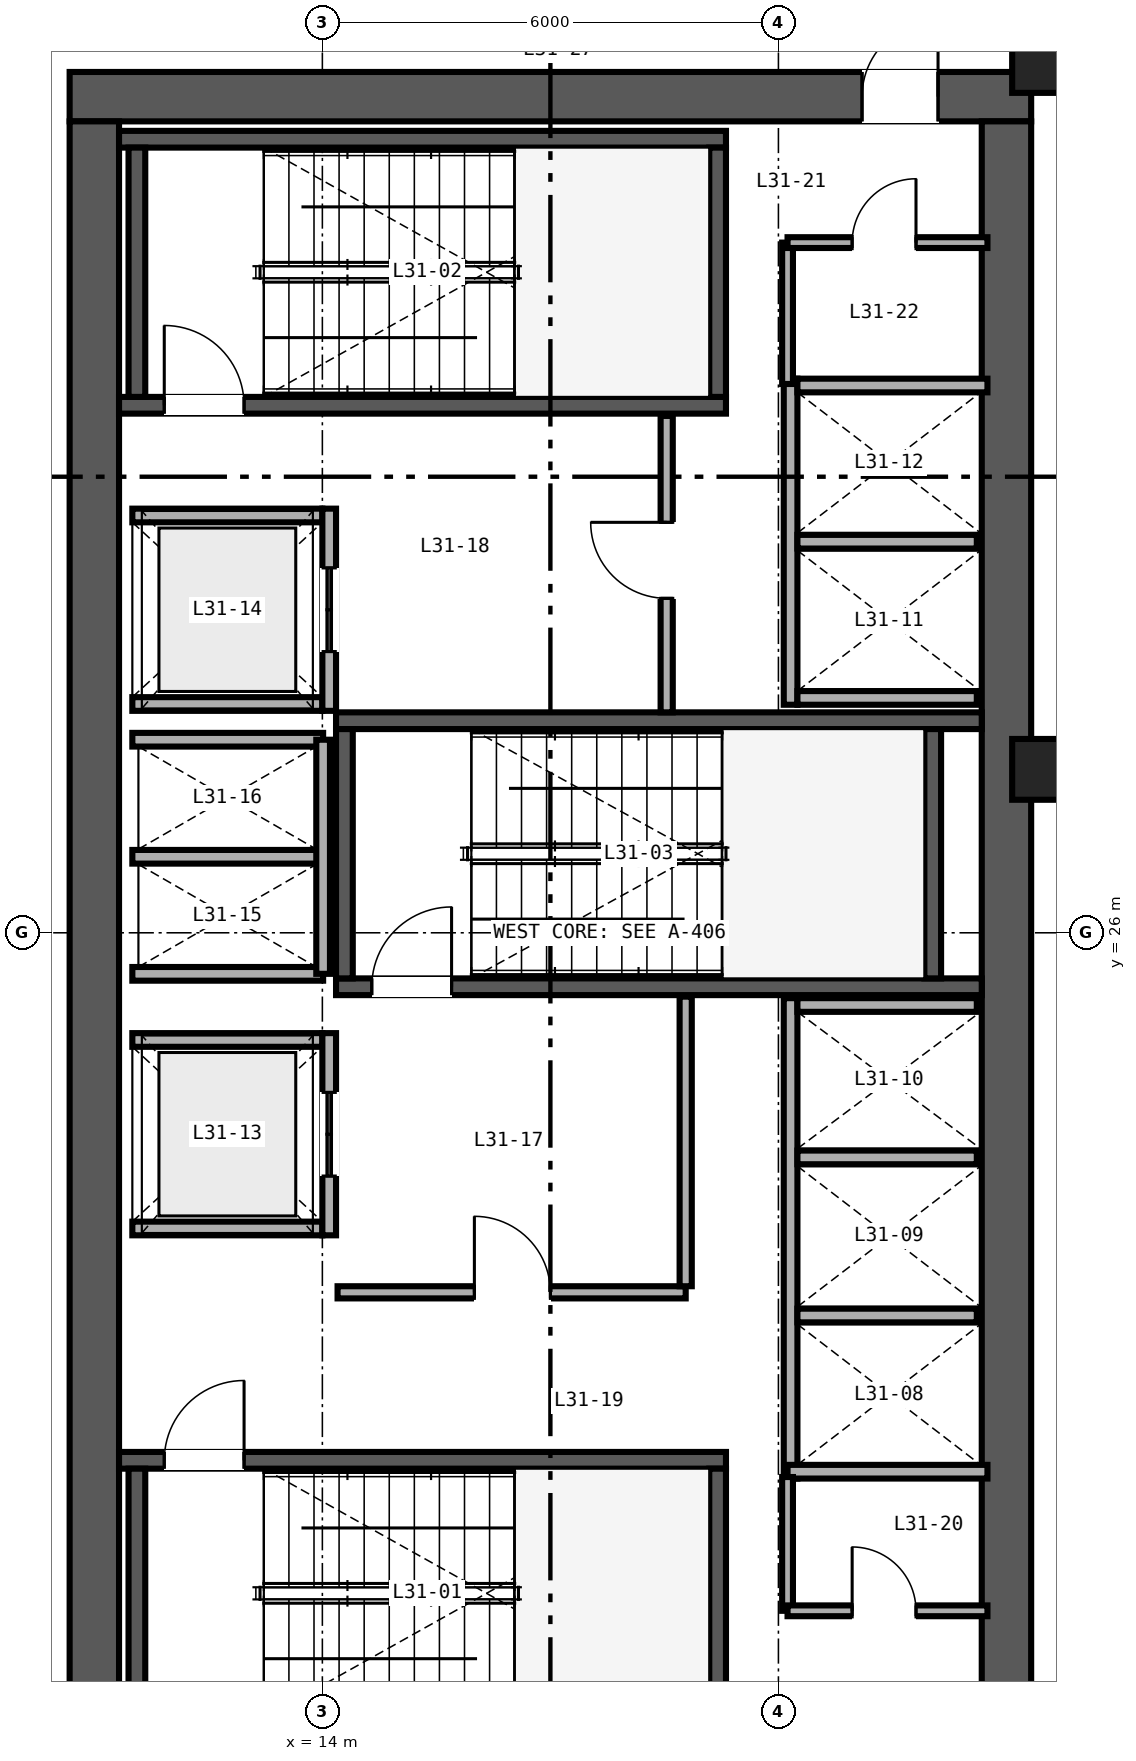
"""IFC4 building model, lengths in metres.
Left out: names, types, materials, properties, quantities, classifications, styles, units other than length and angle.
Written with IfcOpenShell. Run it as: python <this file> out.ifc"""

import sys

from ifc_helpers import new_model, si_unit, direction, frame, frame_2d, origin, origin_2d, place, context, subcontext, project, spatial, rectangle, hollow_rectangle, extrude, source, transform, mapped, element, fill, save


model = new_model("IFC4")
c1 = context("Model", 3, precision=1e-05, world=origin(), true_north=direction((0.0, 1.0)))
c2 = subcontext(c1, "Body", "Model", "MODEL_VIEW")
j1 = project(units=[si_unit("LENGTHUNIT", "METRE"), si_unit("PLANEANGLEUNIT", "RADIAN")], contexts=[c1])
p1 = place(None, origin())
s1 = spatial("IfcSite", under=j1, at=p1, CompositionType="ELEMENT")
p2 = place(p1, origin())
s2 = spatial("IfcBuilding", under=s1, at=p2, CompositionType="ELEMENT")
p3 = place(p2, frame((0.0, 0.0, 126.0)))
s3 = spatial("IfcBuildingStorey", under=s2, at=p3, CompositionType="ELEMENT", Elevation=126.0)
p4 = place(p3, frame((10.675, 37.0, 0.0), z_axis=(0.0, 0.0, 1.0), x_axis=(1.0, 0.0, 0.0)))
e1 = element("IfcWall", 1, at=p4, inside=s3, PredefinedType="SHEAR", context=c2, shape_type="SweptSolid", body=[
    extrude(rectangle(XDim=12.65, YDim=0.65, at=frame_2d((6.325, 0.0))), origin(), (0.0, 0.0, 1.0), 3.36),
])
p5 = place(p4, frame((10.425, 0.0, 0.0)))
e2 = element("IfcOpeningElement", 2, at=p5, cuts=e1, PredefinedType="OPENING", context=c2, shape_type="SweptSolid", body=[
    extrude(rectangle(XDim=1.0, YDim=2.15, at=frame_2d((0.5, 1.075))), frame((0.0, 0.335, 0.0), z_axis=(0.0, -1.0, 0.0), x_axis=(1.0, 0.0, 0.0)), (0.0, 0.0, 1.0), 0.67),
])
for number, where, z_axis, x_axis in (
    (3, (11.0, 15.325, 0.0), (0.0, 0.0, 1.0), (0.0, 1.0, 0.0)),
    (4, (23.0, 15.325, 0.0), (0.0, 0.0, 1.0), (0.0, 1.0, 0.0)),
):
    element("IfcWall", number, at=place(p3, frame(where, z_axis=z_axis, x_axis=x_axis)), inside=s3, PredefinedType="SHEAR", context=c2, shape_type="SweptSolid", body=[
        extrude(rectangle(XDim=21.35, YDim=0.65, at=frame_2d((10.675, 0.0))), origin(), (0.0, 0.0, 1.0), 3.36),
    ])
p6 = place(p3, frame((11.325, 19.06, 0.0), z_axis=(0.0, 0.0, 1.0), x_axis=(1.0, 0.0, 0.0)))
e5 = element("IfcWall", 5, at=p6, inside=s3, PredefinedType="SHEAR", context=c2, shape_type="SweptSolid", body=[
    extrude(rectangle(XDim=7.985, YDim=0.22, at=frame_2d((3.993, 0.0))), origin(), (0.0, 0.0, 1.0), 3.4),
])
p7 = place(p6, frame((0.595, 0.0, 0.0)))
e6 = element("IfcOpeningElement", 6, at=p7, cuts=e5, PredefinedType="OPENING", context=c2, shape_type="SweptSolid", body=[
    extrude(rectangle(XDim=1.05, YDim=2.15, at=frame_2d((0.525, 1.075))), frame((0.0, 0.12, 0.0), z_axis=(0.0, -1.0, 0.0), x_axis=(1.0, 0.0, 0.0)), (0.0, 0.0, 1.0), 0.24),
])
for number, where, z_axis, x_axis in (
    (7, (11.56, 15.67, 0.0), (0.0, 0.0, 1.0), (0.0, 1.0, 0.0)),
    (8, (19.2, 15.67, 0.0), (0.0, 0.0, 1.0), (0.0, 1.0, 0.0)),
):
    element("IfcWall", number, at=place(p3, frame(where, z_axis=z_axis, x_axis=x_axis)), inside=s3, PredefinedType="SHEAR", context=c2, shape_type="SweptSolid", body=[
        extrude(rectangle(XDim=3.28, YDim=0.22, at=frame_2d((1.64, 0.0))), origin(), (0.0, 0.0, 1.0), 3.4),
    ])
p8 = place(p3, frame((11.325, 32.94, 0.0), z_axis=(0.0, 0.0, 1.0), x_axis=(1.0, 0.0, 0.0)))
e9 = element("IfcWall", 9, at=p8, inside=s3, PredefinedType="SHEAR", context=c2, shape_type="SweptSolid", body=[
    extrude(rectangle(XDim=7.985, YDim=0.22, at=frame_2d((3.993, 0.0))), origin(), (0.0, 0.0, 1.0), 3.4),
])
p9 = place(p8, frame((0.595, 0.0, 0.0)))
e10 = element("IfcOpeningElement", 10, at=p9, cuts=e9, PredefinedType="OPENING", context=c2, shape_type="SweptSolid", body=[
    extrude(rectangle(XDim=1.05, YDim=2.15, at=frame_2d((0.525, 1.075))), frame((0.0, 0.12, 0.0), z_axis=(0.0, -1.0, 0.0), x_axis=(1.0, 0.0, 0.0)), (0.0, 0.0, 1.0), 0.24),
])
p10 = place(p3, frame((11.325, 36.44, 0.0), z_axis=(0.0, 0.0, 1.0), x_axis=(1.0, 0.0, 0.0)))
e11 = element("IfcWall", 11, at=p10, inside=s3, PredefinedType="SHEAR", context=c2, shape_type="SweptSolid", body=[
    extrude(rectangle(XDim=7.985, YDim=0.22, at=frame_2d((3.993, 0.0))), origin(), (0.0, 0.0, 1.0), 3.4),
])
for number, where, z_axis, x_axis in (
    (12, (11.56, 33.05, 0.0), (0.0, 0.0, 1.0), (0.0, 1.0, 0.0)),
    (13, (19.2, 33.05, 0.0), (0.0, 0.0, 1.0), (0.0, 1.0, 0.0)),
):
    element("IfcWall", number, at=place(p3, frame(where, z_axis=z_axis, x_axis=x_axis)), inside=s3, PredefinedType="SHEAR", context=c2, shape_type="SweptSolid", body=[
        extrude(rectangle(XDim=3.28, YDim=0.22, at=frame_2d((1.64, 0.0))), origin(), (0.0, 0.0, 1.0), 3.4),
    ])
p11 = place(p3, frame((14.18, 25.29, 0.0), z_axis=(0.0, 0.0, 1.0), x_axis=(1.0, 0.0, 0.0)))
e14 = element("IfcWall", 14, at=p11, inside=s3, PredefinedType="SHEAR", context=c2, shape_type="SweptSolid", body=[
    extrude(rectangle(XDim=8.495, YDim=0.22, at=frame_2d((4.248, 0.0))), origin(), (0.0, 0.0, 1.0), 3.4),
])
p12 = place(p11, frame((0.47, 0.0, 0.0)))
e15 = element("IfcOpeningElement", 15, at=p12, cuts=e14, PredefinedType="OPENING", context=c2, shape_type="SweptSolid", body=[
    extrude(rectangle(XDim=1.05, YDim=2.15, at=frame_2d((0.525, 1.075))), frame((0.0, 0.12, 0.0), z_axis=(0.0, -1.0, 0.0), x_axis=(1.0, 0.0, 0.0)), (0.0, 0.0, 1.0), 0.24),
])
p13 = place(p3, frame((14.18, 28.79, 0.0), z_axis=(0.0, 0.0, 1.0), x_axis=(1.0, 0.0, 0.0)))
e16 = element("IfcWall", 16, at=p13, inside=s3, PredefinedType="SHEAR", context=c2, shape_type="SweptSolid", body=[
    extrude(rectangle(XDim=8.495, YDim=0.22, at=frame_2d((4.248, 0.0))), origin(), (0.0, 0.0, 1.0), 3.4),
])
for number, where, z_axis, x_axis in (
    (17, (14.29, 25.4, 0.0), (0.0, 0.0, 1.0), (0.0, 1.0, 0.0)),
    (18, (22.03, 25.4, 0.0), (0.0, 0.0, 1.0), (0.0, 1.0, 0.0)),
):
    element("IfcWall", number, at=place(p3, frame(where, z_axis=z_axis, x_axis=x_axis)), inside=s3, PredefinedType="SHEAR", context=c2, shape_type="SweptSolid", body=[
        extrude(rectangle(XDim=3.28, YDim=0.22, at=frame_2d((1.64, 0.0))), origin(), (0.0, 0.0, 1.0), 3.4),
    ])
m1 = source(origin(), c2, "Body", "SweptSolid", [
    extrude(hollow_rectangle(XDim=0.85, YDim=0.8, WallThickness=0.032, at=origin_2d()), origin(), (0.0, 0.0, 1.0), 3.36),
])
for number, where, z_axis, x_axis in (
    (19, (23.5, 28.15, 0.0), (0.0, 0.0, 1.0), (1.0, 0.0, 0.0)),
    (20, (23.5, 37.45, 0.0), (0.0, 0.0, 1.0), (1.0, 0.0, 0.0)),
):
    element("IfcColumn", number, at=place(p3, frame(where, z_axis=z_axis, x_axis=x_axis)), inside=s3, PredefinedType="COLUMN", context=c2, shape_type="MappedRepresentation", body=[
        mapped(m1, transform((0.0, 0.0, 0.0), scale=1.0)),
    ])
p14 = place(p3, frame((20.16, 18.82, 0.0), z_axis=(0.0, 0.0, 1.0), x_axis=(0.0, 1.0, 0.0)))
e21 = element("IfcWall", 21, at=p14, inside=s3, PredefinedType="SOLIDWALL", context=c2, shape_type="SweptSolid", body=[
    extrude(rectangle(XDim=6.32, YDim=0.18, at=frame_2d((3.16, 0.0))), origin(), (0.0, 0.0, 1.0), 2.36),
])
p15 = place(p3, frame((20.12, 18.91, 0.0), z_axis=(0.0, 0.0, 1.0), x_axis=(1.0, 0.0, 0.0)))
e22 = element("IfcWall", 22, at=p15, inside=s3, PredefinedType="SOLIDWALL", context=c2, shape_type="SweptSolid", body=[
    extrude(rectangle(XDim=2.63, YDim=0.18, at=frame_2d((1.315, 0.0))), origin(), (0.0, 0.0, 1.0), 3.36),
])
p16 = place(p3, frame((20.25, 25.05, 0.0), z_axis=(0.0, 0.0, 1.0), x_axis=(1.0, 0.0, 0.0)))
e23 = element("IfcWall", 23, at=p16, inside=s3, PredefinedType="SOLIDWALL", context=c2, shape_type="SweptSolid", body=[
    extrude(rectangle(XDim=2.36, YDim=0.18, at=frame_2d((1.18, 0.0))), origin(), (0.0, 0.0, 1.0), 3.36),
])
p17 = place(p3, frame((20.25, 20.965, 0.0), z_axis=(0.0, 0.0, 1.0), x_axis=(1.0, 0.0, 0.0)))
e24 = element("IfcWall", 24, at=p17, inside=s3, PredefinedType="SOLIDWALL", context=c2, shape_type="SweptSolid", body=[
    extrude(rectangle(XDim=2.36, YDim=0.18, at=frame_2d((1.18, 0.0))), origin(), (0.0, 0.0, 1.0), 2.36),
])
p18 = place(p3, frame((20.25, 23.045, 0.0), z_axis=(0.0, 0.0, 1.0), x_axis=(1.0, 0.0, 0.0)))
e25 = element("IfcWall", 25, at=p18, inside=s3, PredefinedType="SOLIDWALL", context=c2, shape_type="SweptSolid", body=[
    extrude(rectangle(XDim=2.36, YDim=0.18, at=frame_2d((1.18, 0.0))), origin(), (0.0, 0.0, 1.0), 3.36),
])
p19 = place(p3, frame((20.16, 29.0, 0.0), z_axis=(0.0, 0.0, 1.0), x_axis=(0.0, 1.0, 0.0)))
e26 = element("IfcWall", 26, at=p19, inside=s3, PredefinedType="SOLIDWALL", context=c2, shape_type="SweptSolid", body=[
    extrude(rectangle(XDim=4.29, YDim=0.18, at=frame_2d((2.145, 0.0))), origin(), (0.0, 0.0, 1.0), 3.36),
])
p20 = place(p3, frame((20.25, 29.09, 0.0), z_axis=(0.0, 0.0, 1.0), x_axis=(1.0, 0.0, 0.0)))
e27 = element("IfcWall", 27, at=p20, inside=s3, PredefinedType="SOLIDWALL", context=c2, shape_type="SweptSolid", body=[
    extrude(rectangle(XDim=2.36, YDim=0.18, at=frame_2d((1.18, 0.0))), origin(), (0.0, 0.0, 1.0), 3.36),
])
p21 = place(p3, frame((20.25, 33.2, 0.0), z_axis=(0.0, 0.0, 1.0), x_axis=(1.0, 0.0, 0.0)))
e28 = element("IfcWall", 28, at=p21, inside=s3, PredefinedType="SOLIDWALL", context=c2, shape_type="SweptSolid", body=[
    extrude(rectangle(XDim=2.5, YDim=0.18, at=frame_2d((1.25, 0.0))), origin(), (0.0, 0.0, 1.0), 3.36),
])
p22 = place(p3, frame((20.25, 31.145, 0.0), z_axis=(0.0, 0.0, 1.0), x_axis=(1.0, 0.0, 0.0)))
e29 = element("IfcWall", 29, at=p22, inside=s3, PredefinedType="SOLIDWALL", context=c2, shape_type="SweptSolid", body=[
    extrude(rectangle(XDim=2.36, YDim=0.18, at=frame_2d((1.18, 0.0))), origin(), (0.0, 0.0, 1.0), 3.36),
])
for number, where, z_axis, x_axis in (
    (30, (11.5, 22.11, 0.0), (0.0, 0.0, 1.0), (1.0, 0.0, 0.0)),
    (31, (11.5, 24.59, 0.0), (0.0, 0.0, 1.0), (1.0, 0.0, 0.0)),
):
    element("IfcWall", number, at=place(p3, frame(where, z_axis=z_axis, x_axis=x_axis)), inside=s3, PredefinedType="SOLIDWALL", context=c2, shape_type="SweptSolid", body=[
        extrude(rectangle(XDim=2.5, YDim=0.18, at=frame_2d((1.25, 0.0))), origin(), (0.0, 0.0, 1.0), 3.36),
    ])
p23 = place(p3, frame((14.09, 22.02, 0.0), z_axis=(0.0, 0.0, 1.0), x_axis=(0.0, 1.0, 0.0)))
e32 = element("IfcWall", 32, at=p23, inside=s3, PredefinedType="SOLIDWALL", context=c2, shape_type="SweptSolid", body=[
    extrude(rectangle(XDim=2.66, YDim=0.18, at=frame_2d((1.33, 0.0))), origin(), (0.0, 0.0, 1.0), 3.36),
])
p24 = place(p23, frame((0.78, 0.0, 0.0)))
e33 = element("IfcOpeningElement", 33, at=p24, cuts=e32, PredefinedType="OPENING", context=c2, shape_type="SweptSolid", body=[
    extrude(rectangle(XDim=1.1, YDim=2.2, at=frame_2d((0.55, 1.1))), frame((0.0, 0.1, 0.0), z_axis=(0.0, -1.0, 0.0), x_axis=(1.0, 0.0, 0.0)), (0.0, 0.0, 1.0), 0.2),
])
for number, where, z_axis, x_axis in (
    (34, (11.5, 29.01, 0.0), (0.0, 0.0, 1.0), (1.0, 0.0, 0.0)),
    (35, (11.5, 31.49, 0.0), (0.0, 0.0, 1.0), (1.0, 0.0, 0.0)),
):
    element("IfcWall", number, at=place(p3, frame(where, z_axis=z_axis, x_axis=x_axis)), inside=s3, PredefinedType="SOLIDWALL", context=c2, shape_type="SweptSolid", body=[
        extrude(rectangle(XDim=2.5, YDim=0.18, at=frame_2d((1.25, 0.0))), origin(), (0.0, 0.0, 1.0), 3.36),
    ])
p25 = place(p3, frame((14.09, 28.92, 0.0), z_axis=(0.0, 0.0, 1.0), x_axis=(0.0, 1.0, 0.0)))
e36 = element("IfcWall", 36, at=p25, inside=s3, PredefinedType="SOLIDWALL", context=c2, shape_type="SweptSolid", body=[
    extrude(rectangle(XDim=2.66, YDim=0.18, at=frame_2d((1.33, 0.0))), origin(), (0.0, 0.0, 1.0), 3.36),
])
p26 = place(p25, frame((0.78, 0.0, 0.0)))
e37 = element("IfcOpeningElement", 37, at=p26, cuts=e36, PredefinedType="OPENING", context=c2, shape_type="SweptSolid", body=[
    extrude(rectangle(XDim=1.1, YDim=2.2, at=frame_2d((0.55, 1.1))), frame((0.0, 0.1, 0.0), z_axis=(0.0, -1.0, 0.0), x_axis=(1.0, 0.0, 0.0)), (0.0, 0.0, 1.0), 0.2),
])
for number, where, z_axis, x_axis in (
    (38, (11.5, 25.46, 0.0), (0.0, 0.0, 1.0), (1.0, 0.0, 0.0)),
    (39, (11.5, 27.0, 0.0), (0.0, 0.0, 1.0), (1.0, 0.0, 0.0)),
    (40, (11.5, 28.54, 0.0), (0.0, 0.0, 1.0), (1.0, 0.0, 0.0)),
):
    element("IfcWall", number, at=place(p3, frame(where, z_axis=z_axis, x_axis=x_axis)), inside=s3, PredefinedType="SOLIDWALL", context=c2, shape_type="SweptSolid", body=[
        extrude(rectangle(XDim=2.51, YDim=0.18, at=frame_2d((1.255, 0.0))), origin(), (0.0, 0.0, 1.0), 3.36),
    ])
p27 = place(p3, frame((14.01, 25.46, 0.0), z_axis=(0.0, 0.0, 1.0), x_axis=(0.0, 1.0, 0.0)))
e41 = element("IfcWall", 41, at=p27, inside=s3, PredefinedType="SOLIDWALL", context=c2, shape_type="SweptSolid", body=[
    extrude(rectangle(XDim=3.08, YDim=0.18, at=frame_2d((1.54, 0.0))), origin(), (0.0, 0.0, 1.0), 3.36),
])
p28 = place(p3, frame((14.2, 21.27, 0.0), z_axis=(0.0, 0.0, 1.0), x_axis=(1.0, 0.0, 0.0)))
e42 = element("IfcWall", 42, at=p28, inside=s3, PredefinedType="PARTITIONING", context=c2, shape_type="SweptSolid", body=[
    extrude(rectangle(XDim=4.58, YDim=0.16, at=frame_2d((2.29, 0.0))), origin(), (0.0, 0.0, 1.0), 3.36),
])
p29 = place(p28, frame((1.8, 0.0, 0.0)))
e43 = element("IfcOpeningElement", 43, at=p29, cuts=e42, PredefinedType="OPENING", context=c2, shape_type="SweptSolid", body=[
    extrude(rectangle(XDim=1.0, YDim=2.15, at=frame_2d((0.5, 1.075))), frame((0.0, 0.09, 0.0), z_axis=(0.0, -1.0, 0.0), x_axis=(1.0, 0.0, 0.0)), (0.0, 0.0, 1.0), 0.18),
])
p30 = place(p3, frame((18.78, 21.35, 0.0), z_axis=(0.0, 0.0, 1.0), x_axis=(0.0, 1.0, 0.0)))
e44 = element("IfcWall", 44, at=p30, inside=s3, PredefinedType="PARTITIONING", context=c2, shape_type="SweptSolid", body=[
    extrude(rectangle(XDim=3.81, YDim=0.16, at=frame_2d((1.905, 0.0))), origin(), (0.0, 0.0, 1.0), 3.36),
])
p31 = place(p3, frame((18.53, 28.9, 0.0), z_axis=(0.0, 0.0, 1.0), x_axis=(0.0, 1.0, 0.0)))
e45 = element("IfcWall", 45, at=p31, inside=s3, PredefinedType="PARTITIONING", context=c2, shape_type="SweptSolid", body=[
    extrude(rectangle(XDim=3.9, YDim=0.16, at=frame_2d((1.95, 0.0))), origin(), (0.0, 0.0, 1.0), 3.36),
])
p32 = place(p31, frame((1.5, 0.0, 0.0)))
e46 = element("IfcOpeningElement", 46, at=p32, cuts=e45, PredefinedType="OPENING", context=c2, shape_type="SweptSolid", body=[
    extrude(rectangle(XDim=1.0, YDim=2.15, at=frame_2d((0.5, 1.075))), frame((0.0, 0.09, 0.0), z_axis=(0.0, -1.0, 0.0), x_axis=(1.0, 0.0, 0.0)), (0.0, 0.0, 1.0), 0.18),
])
p33 = place(p3, frame((20.12, 17.08, 0.0), z_axis=(0.0, 0.0, 1.0), x_axis=(0.0, 1.0, 0.0)))
e47 = element("IfcWall", 47, at=p33, inside=s3, PredefinedType="PARTITIONING", context=c2, shape_type="SweptSolid", body=[
    extrude(rectangle(XDim=1.76, YDim=0.142, at=frame_2d((0.88, 0.0))), origin(), (0.0, 0.0, 1.0), 3.36),
])
p34 = place(p3, frame((20.12, 17.08, 0.0), z_axis=(0.0, 0.0, 1.0), x_axis=(1.0, 0.0, 0.0)))
e48 = element("IfcWall", 48, at=p34, inside=s3, PredefinedType="PARTITIONING", context=c2, shape_type="SweptSolid", body=[
    extrude(rectangle(XDim=2.63, YDim=0.142, at=frame_2d((1.315, 0.0))), origin(), (0.0, 0.0, 1.0), 3.36),
])
p35 = place(p34, frame((0.85, 0.0, 0.0)))
e49 = element("IfcOpeningElement", 49, at=p35, cuts=e48, PredefinedType="OPENING", context=c2, shape_type="SweptSolid", body=[
    extrude(rectangle(XDim=0.84, YDim=2.1, at=frame_2d((0.42, 1.05))), frame((0.0, 0.081, 0.0), z_axis=(0.0, -1.0, 0.0), x_axis=(1.0, 0.0, 0.0)), (0.0, 0.0, 1.0), 0.162),
])
p36 = place(p3, frame((20.12, 33.22, 0.0), z_axis=(0.0, 0.0, 1.0), x_axis=(0.0, 1.0, 0.0)))
e50 = element("IfcWall", 50, at=p36, inside=s3, PredefinedType="PARTITIONING", context=c2, shape_type="SweptSolid", body=[
    extrude(rectangle(XDim=1.86, YDim=0.142, at=frame_2d((0.93, 0.0))), origin(), (0.0, 0.0, 1.0), 3.36),
])
p37 = place(p3, frame((20.12, 35.08, 0.0), z_axis=(0.0, 0.0, 1.0), x_axis=(1.0, 0.0, 0.0)))
e51 = element("IfcWall", 51, at=p37, inside=s3, PredefinedType="PARTITIONING", context=c2, shape_type="SweptSolid", body=[
    extrude(rectangle(XDim=2.63, YDim=0.142, at=frame_2d((1.315, 0.0))), origin(), (0.0, 0.0, 1.0), 3.36),
])
p38 = place(p37, frame((0.85, 0.0, 0.0)))
e52 = element("IfcOpeningElement", 52, at=p38, cuts=e51, PredefinedType="OPENING", context=c2, shape_type="SweptSolid", body=[
    extrude(rectangle(XDim=0.84, YDim=2.1, at=frame_2d((0.42, 1.05))), frame((0.0, 0.081, 0.0), z_axis=(0.0, -1.0, 0.0), x_axis=(1.0, 0.0, 0.0)), (0.0, 0.0, 1.0), 0.162),
])
m2 = source(origin(), c2, "Body", "SweptSolid", [
    extrude(rectangle(XDim=1.05, YDim=2.15, at=frame_2d((0.525, 1.075))), frame((0.0, 0.025, 0.0), z_axis=(0.0, -1.0, 0.0), x_axis=(1.0, 0.0, 0.0)), (0.0, 0.0, 1.0), 0.05),
])
p39 = place(p7, origin())
e53 = element("IfcDoor", 53, at=p39, inside=s3, OperationType="SINGLE_SWING_RIGHT", PredefinedType="DOOR", context=c2, shape_type="MappedRepresentation", body=[
    mapped(m2, transform((0.0, 0.0, 0.0), scale=1.0)),
])
fill(e6, e53)
p40 = place(p9, origin())
e54 = element("IfcDoor", 54, at=p40, inside=s3, OperationType="SINGLE_SWING_LEFT", PredefinedType="DOOR", context=c2, shape_type="MappedRepresentation", body=[
    mapped(m2, transform((0.0, 0.0, 0.0), scale=1.0)),
])
fill(e10, e54)
p41 = place(p12, origin())
e55 = element("IfcDoor", 55, at=p41, inside=s3, OperationType="SINGLE_SWING_RIGHT", PredefinedType="DOOR", context=c2, shape_type="MappedRepresentation", body=[
    mapped(m2, transform((0.0, 0.0, 0.0), scale=1.0)),
])
fill(e15, e55)
m3 = source(origin(), c2, "Body", "SweptSolid", [
    extrude(rectangle(XDim=1.1, YDim=2.2, at=frame_2d((0.55, 1.1))), frame((0.0, 0.025, 0.0), z_axis=(0.0, -1.0, 0.0), x_axis=(1.0, 0.0, 0.0)), (0.0, 0.0, 1.0), 0.05),
])
p42 = place(p24, origin())
e56 = element("IfcDoor", 56, at=p42, inside=s3, OperationType="DOUBLE_DOOR_SLIDING", PredefinedType="DOOR", context=c2, shape_type="MappedRepresentation", body=[
    mapped(m3, transform((0.0, 0.0, 0.0), scale=1.0)),
])
fill(e33, e56)
p43 = place(p26, origin())
e57 = element("IfcDoor", 57, at=p43, inside=s3, OperationType="DOUBLE_DOOR_SLIDING", PredefinedType="DOOR", context=c2, shape_type="MappedRepresentation", body=[
    mapped(m3, transform((0.0, 0.0, 0.0), scale=1.0)),
])
fill(e37, e57)
m4 = source(origin(), c2, "Body", "SweptSolid", [
    extrude(rectangle(XDim=1.0, YDim=2.15, at=frame_2d((0.5, 1.075))), frame((0.0, 0.025, 0.0), z_axis=(0.0, -1.0, 0.0), x_axis=(1.0, 0.0, 0.0)), (0.0, 0.0, 1.0), 0.05),
])
p44 = place(p29, origin())
e58 = element("IfcDoor", 58, at=p44, inside=s3, OperationType="SINGLE_SWING_LEFT", PredefinedType="DOOR", context=c2, shape_type="MappedRepresentation", body=[
    mapped(m4, transform((0.0, 0.0, 0.0), scale=1.0)),
])
fill(e43, e58)
p45 = place(p32, origin())
e59 = element("IfcDoor", 59, at=p45, inside=s3, OperationType="SINGLE_SWING_RIGHT", PredefinedType="DOOR", context=c2, shape_type="MappedRepresentation", body=[
    mapped(m4, transform((0.0, 0.0, 0.0), scale=1.0)),
])
fill(e46, e59)
m5 = source(origin(), c2, "Body", "SweptSolid", [
    extrude(rectangle(XDim=0.84, YDim=2.1, at=frame_2d((0.42, 1.05))), frame((0.0, 0.025, 0.0), z_axis=(0.0, -1.0, 0.0), x_axis=(1.0, 0.0, 0.0)), (0.0, 0.0, 1.0), 0.05),
])
p46 = place(p35, origin())
e60 = element("IfcDoor", 60, at=p46, inside=s3, OperationType="SINGLE_SWING_LEFT", PredefinedType="DOOR", context=c2, shape_type="MappedRepresentation", body=[
    mapped(m5, transform((0.0, 0.0, 0.0), scale=1.0)),
])
fill(e49, e60)
p47 = place(p38, origin())
e61 = element("IfcDoor", 61, at=p47, inside=s3, OperationType="SINGLE_SWING_RIGHT", PredefinedType="DOOR", context=c2, shape_type="MappedRepresentation", body=[
    mapped(m5, transform((0.0, 0.0, 0.0), scale=1.0)),
])
fill(e52, e61)
p48 = place(p5, origin())
e62 = element("IfcDoor", 62, at=p48, inside=s3, OperationType="SINGLE_SWING_RIGHT", PredefinedType="DOOR", context=c2, shape_type="MappedRepresentation", body=[
    mapped(m4, transform((0.0, 0.0, 0.0), scale=1.0)),
])
fill(e2, e62)
save(model, sys.argv[1])
